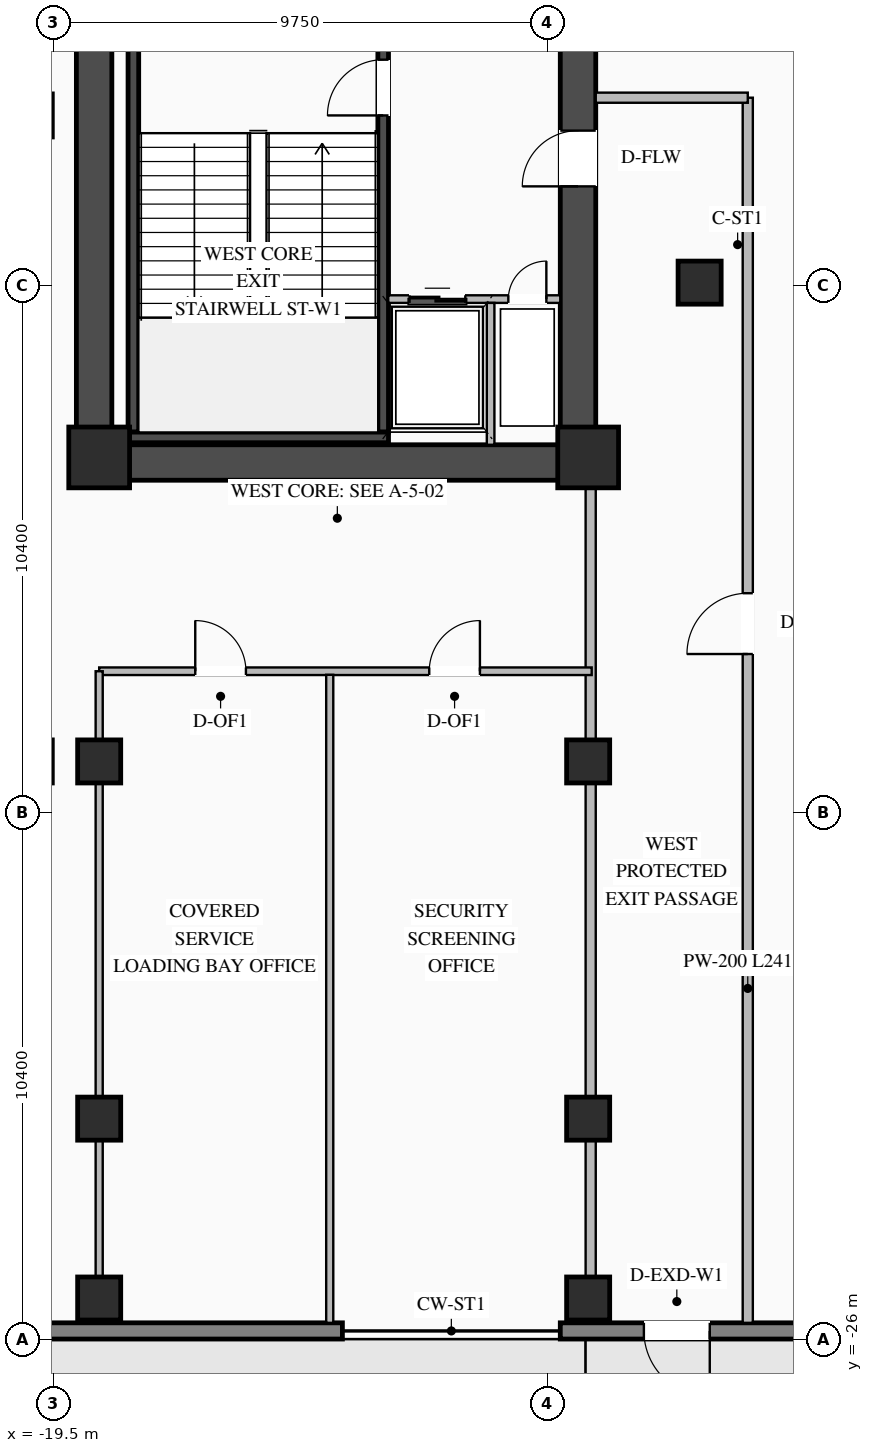
"""IFC4 building model, lengths in metres.
Left out: names, types, materials, properties, quantities, classifications, styles, units other than length and angle.
Written with IfcOpenShell. Run it as: python <this file> out.ifc"""

import sys

from ifc_helpers import new_model, si_unit, direction, frame, frame_2d, origin, origin_2d, place, context, subcontext, project, spatial, rectangle, i_section, extrude, element, fill, save


model = new_model("IFC4")
c1 = context("Model", 3, precision=1e-05, world=origin(), true_north=direction((0.0, 1.0)))
c2 = subcontext(c1, "Body", "Model", "MODEL_VIEW")
j1 = project(units=[si_unit("LENGTHUNIT", "METRE"), si_unit("PLANEANGLEUNIT", "RADIAN")], contexts=[c1])
p1 = place(None, origin())
s1 = spatial("IfcSite", under=j1, at=p1, CompositionType="ELEMENT")
p2 = place(p1, origin())
s2 = spatial("IfcBuilding", under=s1, at=p2, CompositionType="ELEMENT")
p3 = place(p2, origin())
s3 = spatial("IfcBuildingStorey", under=s2, at=p3, CompositionType="ELEMENT", Elevation=0.0)
p4 = place(p3, frame((-19.05, -8.7, 0.0), z_axis=(0.0, 0.0, 1.0), x_axis=(1.0, 0.0, 0.0)))
e1 = element("IfcWall", 1, at=p4, inside=s3, PredefinedType="SHEAR", context=c2, shape_type="SweptSolid", body=[
    extrude(rectangle(XDim=10.25, YDim=0.7, at=frame_2d((5.125, 0.0))), origin(), (0.0, 0.0, 1.0), 4.85),
])
p5 = place(p3, frame((-18.7, -8.35, 0.0), z_axis=(0.0, 0.0, 1.0), x_axis=(0.0, 1.0, 0.0)))
e2 = element("IfcWall", 2, at=p5, inside=s3, PredefinedType="SHEAR", context=c2, shape_type="SweptSolid", body=[
    extrude(rectangle(XDim=16.7, YDim=0.7, at=frame_2d((8.35, 0.0))), origin(), (0.0, 0.0, 1.0), 4.85),
])
p6 = place(p3, frame((-9.15, -8.35, 0.0), z_axis=(0.0, 0.0, 1.0), x_axis=(0.0, 1.0, 0.0)))
e3 = element("IfcWall", 3, at=p6, inside=s3, PredefinedType="SHEAR", context=c2, shape_type="SweptSolid", body=[
    extrude(rectangle(XDim=16.7, YDim=0.7, at=frame_2d((8.35, 0.0))), origin(), (0.0, 0.0, 1.0), 4.85),
])
p7 = place(p6, frame((5.1, 0.0, 0.0)))
e4 = element("IfcOpeningElement", 4, at=p7, cuts=e3, PredefinedType="OPENING", context=c2, shape_type="SweptSolid", body=[
    extrude(rectangle(XDim=1.1, YDim=2.08, at=frame_2d((0.55, 1.04))), frame((0.0, 0.36, 0.0), z_axis=(0.0, -1.0, 0.0), x_axis=(1.0, 0.0, 0.0)), (0.0, 0.0, 1.0), 0.72),
])
p8 = place(p3, frame((-12.995, -8.1, 0.0), z_axis=(0.0, 0.0, 1.0), x_axis=(0.0, 1.0, 0.0)))
e5 = element("IfcWall", 5, at=p8, inside=s3, PredefinedType="SHEAR", context=c2, shape_type="SweptSolid", body=[
    extrude(rectangle(XDim=8.2, YDim=0.21, at=frame_2d((4.1, 0.0))), origin(), (0.0, 0.0, 1.0), 4.85),
])
p9 = place(p8, frame((6.25, 0.0, 0.0)))
e6 = element("IfcOpeningElement", 6, at=p9, cuts=e5, PredefinedType="OPENING", context=c2, shape_type="SweptSolid", body=[
    extrude(rectangle(XDim=1.1, YDim=2.15, at=frame_2d((0.55, 1.075))), frame((0.0, 0.115, 0.0), z_axis=(0.0, -1.0, 0.0), x_axis=(1.0, 0.0, 0.0)), (0.0, 0.0, 1.0), 0.23),
])
p10 = place(p3, frame((-17.925, -8.1, 0.0), z_axis=(0.0, 0.0, 1.0), x_axis=(0.0, 1.0, 0.0)))
e7 = element("IfcWall", 7, at=p10, inside=s3, PredefinedType="SHEAR", context=c2, shape_type="SweptSolid", body=[
    extrude(rectangle(XDim=8.2, YDim=0.21, at=frame_2d((4.1, 0.0))), origin(), (0.0, 0.0, 1.0), 4.85),
])
p11 = place(p3, frame((-18.03, -8.205, 0.0), z_axis=(0.0, 0.0, 1.0), x_axis=(1.0, 0.0, 0.0)))
e8 = element("IfcWall", 8, at=p11, inside=s3, PredefinedType="SHEAR", context=c2, shape_type="SweptSolid", body=[
    extrude(rectangle(XDim=5.14, YDim=0.21, at=frame_2d((2.57, 0.0))), origin(), (0.0, 0.0, 1.0), 4.85),
])
for number, where, z_axis, x_axis in (
    (9, (-8.95, -8.6, 0.0), (0.0, 0.0, 1.0), (1.0, 0.0, 0.0)),
    (10, (-18.6, -8.6, 0.0), (0.0, 0.0, 1.0), (1.0, 0.0, 0.0)),
):
    element("IfcColumn", number, at=place(p3, frame(where, z_axis=z_axis, x_axis=x_axis)), inside=s3, PredefinedType="COLUMN", context=c2, shape_type="SweptSolid", body=[
        extrude(rectangle(XDim=1.2, YDim=1.2, at=origin_2d()), origin(), (0.0, 0.0, 1.0), 5.1),
    ])
for number, where, z_axis, x_axis in (
    (11, (-6.75, -5.15, 0.0), (0.0, 0.0, 1.0), (1.0, 0.0, 0.0)),
    (12, (-19.95, -14.6, 0.0), (0.0, 0.0, 1.0), (1.0, 0.0, 0.0)),
    (13, (-18.6, -14.6, 0.0), (0.0, 0.0, 1.0), (1.0, 0.0, 0.0)),
    (14, (-8.95, -14.6, 0.0), (0.0, 0.0, 1.0), (1.0, 0.0, 0.0)),
    (15, (-19.95, -1.85, 0.0), (0.0, 0.0, 1.0), (1.0, 0.0, 0.0)),
    (16, (-18.6, -21.65, 0.0), (0.0, 0.0, 1.0), (1.0, 0.0, 0.0)),
    (17, (-8.95, -21.65, 0.0), (0.0, 0.0, 1.0), (1.0, 0.0, 0.0)),
    (18, (-18.6, -25.2, 0.0), (0.0, 0.0, 1.0), (1.0, 0.0, 0.0)),
    (19, (-8.95, -25.2, 0.0), (0.0, 0.0, 1.0), (1.0, 0.0, 0.0)),
):
    element("IfcColumn", number, at=place(p3, frame(where, z_axis=z_axis, x_axis=x_axis)), inside=s3, PredefinedType="COLUMN", context=c2, shape_type="SweptSolid", body=[
        extrude(i_section(OverallWidth=0.85, OverallDepth=0.85, WebThickness=0.032, FlangeThickness=0.048, at=origin_2d()), origin(), (0.0, 0.0, 1.0), 5.1),
    ])
p12 = place(p3, frame((9.5, -25.84, 0.0), z_axis=(0.0, 0.0, 1.0), x_axis=(-1.0, 0.0, 0.0)))
e20 = element("IfcWall", 20, at=p12, inside=s3, PredefinedType="STANDARD", context=c2, shape_type="SweptSolid", body=[
    extrude(rectangle(XDim=19.0, YDim=0.32, at=frame_2d((9.5, 0.0))), origin(), (0.0, 0.0, 1.0), 4.83),
])
p13 = place(p12, frame((1.65, 0.0, 0.0)))
e21 = element("IfcOpeningElement", 21, at=p13, cuts=e20, PredefinedType="OPENING", context=c2, shape_type="SweptSolid", body=[
    extrude(rectangle(XDim=1.3, YDim=2.2, at=frame_2d((0.65, 1.1))), frame((0.0, 0.17, 0.0), z_axis=(0.0, -1.0, 0.0), x_axis=(1.0, 0.0, 0.0)), (0.0, 0.0, 1.0), 0.34),
])
p14 = place(p12, frame((5.0, 0.0, 0.0)))
e22 = element("IfcOpeningElement", 22, at=p14, cuts=e20, PredefinedType="OPENING", context=c2, shape_type="SweptSolid", body=[
    extrude(rectangle(XDim=2.4, YDim=2.4, at=frame_2d((1.2, 1.2))), frame((0.0, 0.17, 0.0), z_axis=(0.0, -1.0, 0.0), x_axis=(1.0, 0.0, 0.0)), (0.0, 0.0, 1.0), 0.34),
])
p15 = place(p12, frame((8.5, 0.0, 0.0)))
e23 = element("IfcOpeningElement", 23, at=p15, cuts=e20, PredefinedType="OPENING", context=c2, shape_type="SweptSolid", body=[
    extrude(rectangle(XDim=2.0, YDim=2.3, at=frame_2d((1.0, 1.15))), frame((0.0, 0.17, 0.0), z_axis=(0.0, -1.0, 0.0), x_axis=(1.0, 0.0, 0.0)), (0.0, 0.0, 1.0), 0.34),
])
p16 = place(p12, frame((11.6, 0.0, 0.0)))
e24 = element("IfcOpeningElement", 24, at=p16, cuts=e20, PredefinedType="OPENING", context=c2, shape_type="SweptSolid", body=[
    extrude(rectangle(XDim=2.4, YDim=2.4, at=frame_2d((1.2, 1.2))), frame((0.0, 0.17, 0.0), z_axis=(0.0, -1.0, 0.0), x_axis=(1.0, 0.0, 0.0)), (0.0, 0.0, 1.0), 0.34),
])
p17 = place(p12, frame((16.05, 0.0, 0.0)))
e25 = element("IfcOpeningElement", 25, at=p17, cuts=e20, PredefinedType="OPENING", context=c2, shape_type="SweptSolid", body=[
    extrude(rectangle(XDim=1.3, YDim=2.2, at=frame_2d((0.65, 1.1))), frame((0.0, 0.17, 0.0), z_axis=(0.0, -1.0, 0.0), x_axis=(1.0, 0.0, 0.0)), (0.0, 0.0, 1.0), 0.34),
])
p18 = place(p3, frame((-13.8, -25.84, 0.0), z_axis=(0.0, 0.0, 1.0), x_axis=(-1.0, 0.0, 0.0)))
e26 = element("IfcWall", 26, at=p18, inside=s3, PredefinedType="STANDARD", context=c2, shape_type="SweptSolid", body=[
    extrude(rectangle(XDim=24.88, YDim=0.32, at=frame_2d((12.44, 0.0))), origin(), (0.0, 0.0, 1.0), 4.83),
])
p19 = place(p18, frame((6.95, 0.0, 0.0)))
e27 = element("IfcOpeningElement", 27, at=p19, cuts=e26, PredefinedType="OPENING", context=c2, shape_type="SweptSolid", body=[
    extrude(rectangle(XDim=1.3, YDim=2.2, at=frame_2d((0.65, 1.1))), frame((0.0, 0.17, 0.0), z_axis=(0.0, -1.0, 0.0), x_axis=(1.0, 0.0, 0.0)), (0.0, 0.0, 1.0), 0.34),
])
p20 = place(p3, frame((-12.895, -5.475, 0.0), z_axis=(0.0, 0.0, 1.0), x_axis=(1.0, 0.0, 0.0)))
e28 = element("IfcWall", 28, at=p20, inside=s3, PredefinedType="STANDARD", context=c2, shape_type="SweptSolid", body=[
    extrude(rectangle(XDim=3.395, YDim=0.15, at=frame_2d((1.698, 0.0))), origin(), (0.0, 0.0, 1.0), 4.83),
])
p21 = place(p20, frame((0.42, 0.0, 0.0)))
e29 = element("IfcOpeningElement", 29, at=p21, cuts=e28, PredefinedType="OPENING", context=c2, shape_type="SweptSolid", body=[
    extrude(rectangle(XDim=1.1, YDim=2.15, at=frame_2d((0.55, 1.075))), frame((0.0, 0.085, 0.0), z_axis=(0.0, -1.0, 0.0), x_axis=(1.0, 0.0, 0.0)), (0.0, 0.0, 1.0), 0.17),
])
p22 = place(p20, frame((2.37, 0.0, 0.0)))
e30 = element("IfcOpeningElement", 30, at=p22, cuts=e28, PredefinedType="OPENING", context=c2, shape_type="SweptSolid", body=[
    extrude(rectangle(XDim=0.75, YDim=2.05, at=frame_2d((0.375, 1.025))), frame((0.0, 0.085, 0.0), z_axis=(0.0, -1.0, 0.0), x_axis=(1.0, 0.0, 0.0)), (0.0, 0.0, 1.0), 0.17),
])
p23 = place(p3, frame((-10.875, -8.35, 0.0), z_axis=(0.0, 0.0, 1.0), x_axis=(0.0, 1.0, 0.0)))
e31 = element("IfcWall", 31, at=p23, inside=s3, PredefinedType="STANDARD", context=c2, shape_type="SweptSolid", body=[
    extrude(rectangle(XDim=2.8, YDim=0.15, at=frame_2d((1.4, 0.0))), origin(), (0.0, 0.0, 1.0), 4.83),
])
p24 = place(p3, frame((-5.8, -25.68, 0.0), z_axis=(0.0, 0.0, 1.0), x_axis=(0.0, 1.0, 0.0)))
e32 = element("IfcWall", 32, at=p24, inside=s3, PredefinedType="STANDARD", context=c2, shape_type="SweptSolid", body=[
    extrude(rectangle(XDim=24.18, YDim=0.2, at=frame_2d((12.09, 0.0))), origin(), (0.0, 0.0, 1.0), 4.83),
])
p25 = place(p24, frame((13.2, 0.0, 0.0)))
e33 = element("IfcOpeningElement", 33, at=p25, cuts=e32, PredefinedType="OPENING", context=c2, shape_type="SweptSolid", body=[
    extrude(rectangle(XDim=1.2, YDim=2.1, at=frame_2d((0.6, 1.05))), frame((0.0, 0.11, 0.0), z_axis=(0.0, -1.0, 0.0), x_axis=(1.0, 0.0, 0.0)), (0.0, 0.0, 1.0), 0.22),
])
p26 = place(p3, frame((-8.9, -25.68, 0.0), z_axis=(0.0, 0.0, 1.0), x_axis=(0.0, 1.0, 0.0)))
e34 = element("IfcWall", 34, at=p26, inside=s3, PredefinedType="STANDARD", context=c2, shape_type="SweptSolid", body=[
    extrude(rectangle(XDim=16.63, YDim=0.2, at=frame_2d((8.315, 0.0))), origin(), (0.0, 0.0, 1.0), 4.025),
])
p27 = place(p3, frame((-8.8, -1.5, 0.0), z_axis=(0.0, 0.0, 1.0), x_axis=(1.0, 0.0, 0.0)))
e35 = element("IfcWall", 35, at=p27, inside=s3, PredefinedType="STANDARD", context=c2, shape_type="SweptSolid", body=[
    extrude(rectangle(XDim=3.0, YDim=0.2, at=frame_2d((1.5, 0.0))), origin(), (0.0, 0.0, 1.0), 4.83),
])
p28 = place(p3, frame((-18.6, -12.82, 0.0), z_axis=(0.0, 0.0, 1.0), x_axis=(1.0, 0.0, 0.0)))
e36 = element("IfcWall", 36, at=p28, inside=s3, PredefinedType="STANDARD", context=c2, shape_type="SweptSolid", body=[
    extrude(rectangle(XDim=9.72, YDim=0.15, at=frame_2d((4.86, 0.0))), origin(), (0.0, 0.0, 1.0), 4.83),
])
p29 = place(p28, frame((1.896, 0.0, 0.0)))
e37 = element("IfcOpeningElement", 37, at=p29, cuts=e36, PredefinedType="OPENING", context=c2, shape_type="SweptSolid", body=[
    extrude(rectangle(XDim=1.0, YDim=2.08, at=frame_2d((0.5, 1.04))), frame((0.0, 0.085, 0.0), z_axis=(0.0, -1.0, 0.0), x_axis=(1.0, 0.0, 0.0)), (0.0, 0.0, 1.0), 0.17),
])
p30 = place(p28, frame((6.514, 0.0, 0.0)))
e38 = element("IfcOpeningElement", 38, at=p30, cuts=e36, PredefinedType="OPENING", context=c2, shape_type="SweptSolid", body=[
    extrude(rectangle(XDim=1.0, YDim=2.08, at=frame_2d((0.5, 1.04))), frame((0.0, 0.085, 0.0), z_axis=(0.0, -1.0, 0.0), x_axis=(1.0, 0.0, 0.0)), (0.0, 0.0, 1.0), 0.17),
])
p31 = place(p3, frame((-18.6, -25.68, 0.0), z_axis=(0.0, 0.0, 1.0), x_axis=(0.0, 1.0, 0.0)))
e39 = element("IfcWall", 39, at=p31, inside=s3, PredefinedType="STANDARD", context=c2, shape_type="SweptSolid", body=[
    extrude(rectangle(XDim=12.86, YDim=0.14, at=frame_2d((6.43, 0.0))), origin(), (0.0, 0.0, 1.0), 4.025),
])
p32 = place(p3, frame((-14.05, -25.68, 0.0), z_axis=(0.0, 0.0, 1.0), x_axis=(0.0, 1.0, 0.0)))
e40 = element("IfcWall", 40, at=p32, inside=s3, PredefinedType="STANDARD", context=c2, shape_type="SweptSolid", body=[
    extrude(rectangle(XDim=12.79, YDim=0.14, at=frame_2d((6.395, 0.0))), origin(), (0.0, 0.0, 1.0), 4.83),
])
p33 = place(p17, origin())
e41 = element("IfcDoor", 41, at=p33, inside=s3, OperationType="SINGLE_SWING_LEFT", PredefinedType="DOOR", context=c2, shape_type="SweptSolid", body=[
    extrude(rectangle(XDim=1.3, YDim=2.2, at=frame_2d((0.65, 1.1))), frame((0.0, 0.025, 0.0), z_axis=(0.0, -1.0, 0.0), x_axis=(1.0, 0.0, 0.0)), (0.0, 0.0, 1.0), 0.05),
])
fill(e25, e41)
p34 = place(p9, origin())
e42 = element("IfcDoor", 42, at=p34, inside=s3, OperationType="SINGLE_SWING_LEFT", PredefinedType="DOOR", context=c2, shape_type="SweptSolid", body=[
    extrude(rectangle(XDim=1.1, YDim=2.15, at=frame_2d((0.55, 1.075))), frame((0.0, 0.025, 0.0), z_axis=(0.0, -1.0, 0.0), x_axis=(1.0, 0.0, 0.0)), (0.0, 0.0, 1.0), 0.05),
])
fill(e6, e42)
p35 = place(p21, origin())
e43 = element("IfcDoor", 43, at=p35, inside=s3, OperationType="DOUBLE_DOOR_SLIDING", PredefinedType="DOOR", context=c2, shape_type="SweptSolid", body=[
    extrude(rectangle(XDim=1.1, YDim=2.15, at=frame_2d((0.55, 1.075))), frame((0.0, 0.025, 0.0), z_axis=(0.0, -1.0, 0.0), x_axis=(1.0, 0.0, 0.0)), (0.0, 0.0, 1.0), 0.05),
])
fill(e29, e43)
p36 = place(p22, origin())
e44 = element("IfcDoor", 44, at=p36, inside=s3, OperationType="SINGLE_SWING_RIGHT", PredefinedType="DOOR", context=c2, shape_type="SweptSolid", body=[
    extrude(rectangle(XDim=0.75, YDim=2.05, at=frame_2d((0.375, 1.025))), frame((0.0, 0.025, 0.0), z_axis=(0.0, -1.0, 0.0), x_axis=(1.0, 0.0, 0.0)), (0.0, 0.0, 1.0), 0.05),
])
fill(e30, e44)
p37 = place(p7, origin())
e45 = element("IfcDoor", 45, at=p37, inside=s3, OperationType="SINGLE_SWING_LEFT", PredefinedType="DOOR", context=c2, shape_type="SweptSolid", body=[
    extrude(rectangle(XDim=1.1, YDim=2.08, at=frame_2d((0.55, 1.04))), frame((0.0, 0.305, 0.0), z_axis=(0.0, -1.0, 0.0), x_axis=(1.0, 0.0, 0.0)), (0.0, 0.0, 1.0), 0.05),
])
fill(e4, e45)
p38 = place(p25, origin())
e46 = element("IfcDoor", 46, at=p38, inside=s3, OperationType="SINGLE_SWING_LEFT", PredefinedType="DOOR", context=c2, shape_type="SweptSolid", body=[
    extrude(rectangle(XDim=1.2, YDim=2.1, at=frame_2d((0.6, 1.05))), frame((0.0, 0.025, 0.0), z_axis=(0.0, -1.0, 0.0), x_axis=(1.0, 0.0, 0.0)), (0.0, 0.0, 1.0), 0.05),
])
fill(e33, e46)
p39 = place(p29, origin())
e47 = element("IfcDoor", 47, at=p39, inside=s3, OperationType="SINGLE_SWING_LEFT", PredefinedType="DOOR", context=c2, shape_type="SweptSolid", body=[
    extrude(rectangle(XDim=1.0, YDim=2.08, at=frame_2d((0.5, 1.04))), frame((0.0, 0.025, 0.0), z_axis=(0.0, -1.0, 0.0), x_axis=(1.0, 0.0, 0.0)), (0.0, 0.0, 1.0), 0.05),
])
fill(e37, e47)
p40 = place(p30, origin())
e48 = element("IfcDoor", 48, at=p40, inside=s3, OperationType="SINGLE_SWING_RIGHT", PredefinedType="DOOR", context=c2, shape_type="SweptSolid", body=[
    extrude(rectangle(XDim=1.0, YDim=2.08, at=frame_2d((0.5, 1.04))), frame((0.0, 0.025, 0.0), z_axis=(0.0, -1.0, 0.0), x_axis=(1.0, 0.0, 0.0)), (0.0, 0.0, 1.0), 0.05),
])
fill(e38, e48)
save(model, sys.argv[1])
